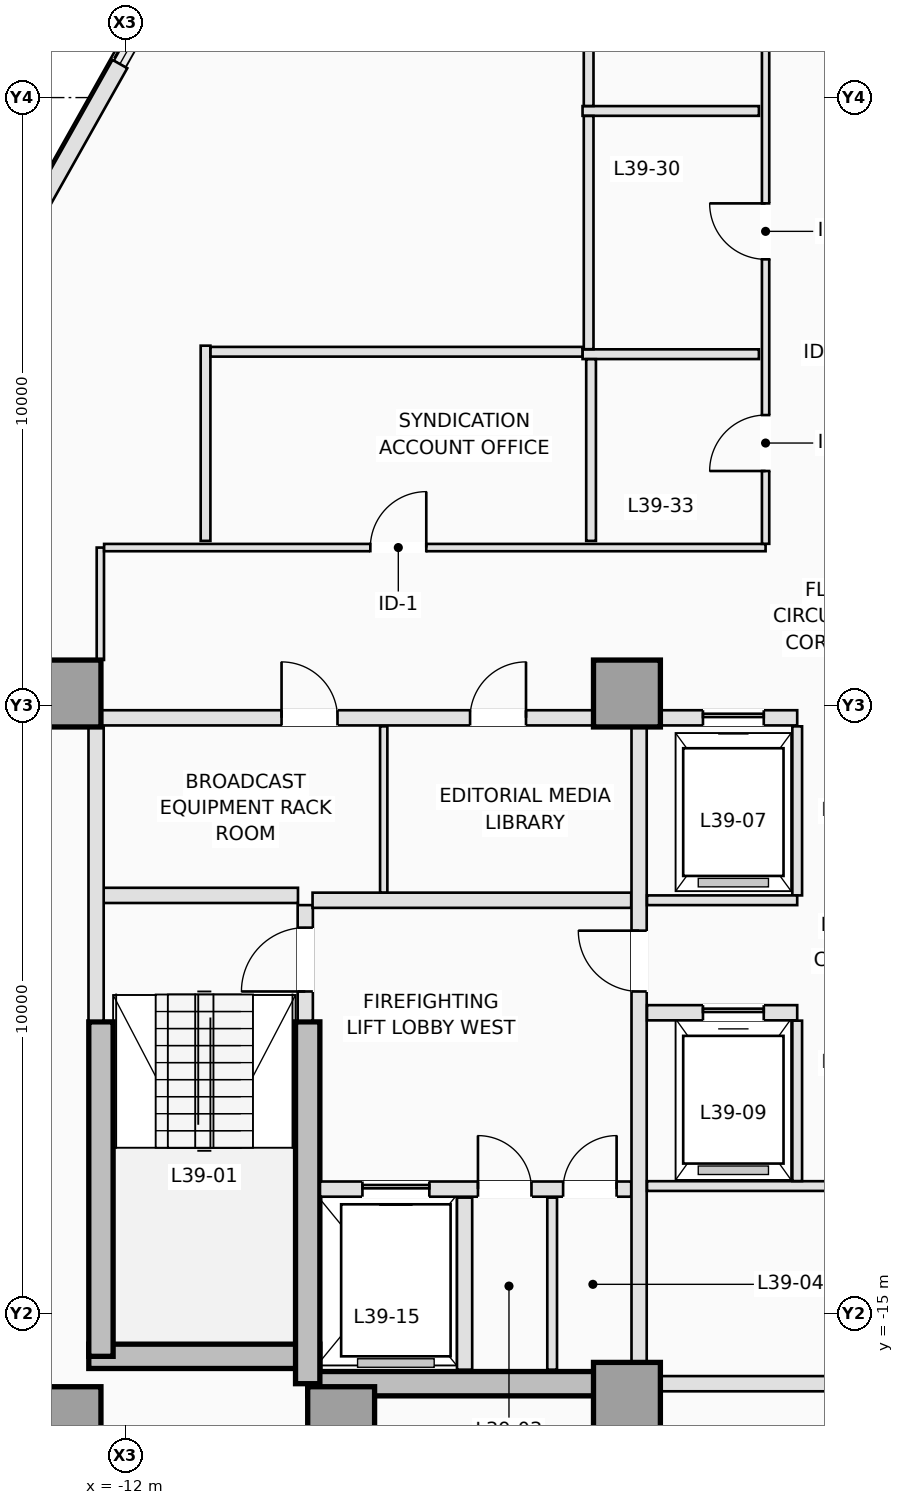
"""IFC4 building model, lengths in metres.
Left out: names, types, materials, properties, quantities, classifications, styles, units other than length and angle.
Written with IfcOpenShell. Run it as: python <this file> out.ifc"""

import sys

from ifc_helpers import new_model, si_unit, direction, frame, frame_2d, origin, origin_2d, place, context, subcontext, project, spatial, rectangle, extrude, element, fill, save


model = new_model("IFC4")
c1 = context("Model", 3, precision=1e-05, world=origin(), true_north=direction((0.0, 1.0)))
c2 = subcontext(c1, "Body", "Model", "MODEL_VIEW")
j1 = project(units=[si_unit("LENGTHUNIT", "METRE"), si_unit("PLANEANGLEUNIT", "RADIAN")], contexts=[c1])
p1 = place(None, origin())
s1 = spatial("IfcSite", under=j1, at=p1, CompositionType="ELEMENT")
p2 = place(p1, origin())
s2 = spatial("IfcBuilding", under=s1, at=p2, CompositionType="ELEMENT")
p3 = place(p2, frame((0.0, 0.0, 144.0)))
s3 = spatial("IfcBuildingStorey", under=s2, at=p3, CompositionType="ELEMENT", Elevation=144.0)
p4 = place(p3, frame((-12.6, -15.7, 0.0), z_axis=(0.0, 0.0, 1.0), x_axis=(1.0, 0.0, 0.0)))
e1 = element("IfcWall", 1, at=p4, inside=s3, PredefinedType="SHEAR", context=c2, shape_type="SweptSolid", body=[
    extrude(rectangle(XDim=3.8, YDim=0.4, at=frame_2d((1.9, 0.0))), origin(), (0.0, 0.0, 1.0), 3.5),
])
p5 = place(p3, frame((-9.0, -16.15, 0.0), z_axis=(0.0, 0.0, 1.0), x_axis=(1.0, 0.0, 0.0)))
e2 = element("IfcWall", 2, at=p5, inside=s3, PredefinedType="SHEAR", context=c2, shape_type="SweptSolid", body=[
    extrude(rectangle(XDim=5.25, YDim=0.4, at=frame_2d((2.625, 0.0))), origin(), (0.0, 0.0, 1.0), 3.5),
])
p6 = place(p3, frame((-12.4, -15.7, 0.0), z_axis=(0.0, 0.0, 1.0), x_axis=(0.0, 1.0, 0.0)))
e3 = element("IfcWall", 3, at=p6, inside=s3, PredefinedType="SHEAR", context=c2, shape_type="SweptSolid", body=[
    extrude(rectangle(XDim=5.5, YDim=0.4, at=frame_2d((2.75, 0.0))), origin(), (0.0, 0.0, 1.0), 3.5),
])
p7 = place(p3, frame((-9.0, -16.15, 0.0), z_axis=(0.0, 0.0, 1.0), x_axis=(0.0, 1.0, 0.0)))
e4 = element("IfcWall", 4, at=p7, inside=s3, PredefinedType="SHEAR", context=c2, shape_type="SweptSolid", body=[
    extrude(rectangle(XDim=5.95, YDim=0.4, at=frame_2d((2.975, 0.0))), origin(), (0.0, 0.0, 1.0), 3.5),
])
for number, where, z_axis, x_axis in (
    (5, (-12.95, -16.75, 0.0), (0.0, 0.0, 1.0), (1.0, 0.0, 0.0)),
    (6, (-8.45, -16.75, 0.0), (0.0, 0.0, 1.0), (1.0, 0.0, 0.0)),
    (7, (-3.75, -16.35, 0.0), (0.0, 0.0, 1.0), (1.0, 0.0, 0.0)),
    (8, (-12.95, -4.8, 0.0), (0.0, 0.0, 1.0), (1.0, 0.0, 0.0)),
    (9, (-3.75, -4.8, 0.0), (0.0, 0.0, 1.0), (1.0, 0.0, 0.0)),
):
    element("IfcColumn", number, at=place(p3, frame(where, z_axis=z_axis, x_axis=x_axis)), inside=s3, PredefinedType="COLUMN", context=c2, shape_type="SweptSolid", body=[
        extrude(rectangle(XDim=1.1, YDim=1.1, at=origin_2d()), origin(), (0.0, 0.0, 1.0), 3.5),
    ])
p8 = place(p3, frame((-13.706, 2.677, 0.0), z_axis=(0.0, 0.0, 1.0), x_axis=(0.490285834707, 0.871561701938, 0.0)))
e10 = element("IfcWall", 10, at=p8, inside=s3, PredefinedType="STANDARD", context=c2, shape_type="SweptSolid", body=[
    extrude(rectangle(XDim=3.299, YDim=0.28, at=frame_2d((1.649, 0.0))), origin(), (0.0, 0.0, 1.0), 3.25),
])
p9 = place(p3, frame((-9.04, -10.18, 0.0), z_axis=(0.0, 0.0, 1.0), x_axis=(0.0, 1.0, 0.0)))
e11 = element("IfcWall", 11, at=p9, inside=s3, PredefinedType="PARTITIONING", context=c2, shape_type="SweptSolid", body=[
    extrude(rectangle(XDim=1.9, YDim=0.25, at=frame_2d((0.95, 0.0))), origin(), (0.0, 0.0, 1.0), 3.25),
])
p10 = place(p9, frame((0.48, 0.0, 0.0)))
e12 = element("IfcOpeningElement", 12, at=p10, cuts=e11, PredefinedType="OPENING", context=c2, shape_type="SweptSolid", body=[
    extrude(rectangle(XDim=1.05, YDim=2.15, at=frame_2d((0.525, 1.075))), frame((0.0, 0.135, 0.0), z_axis=(0.0, -1.0, 0.0), x_axis=(1.0, 0.0, 0.0)), (0.0, 0.0, 1.0), 0.27),
])
p11 = place(p3, frame((-12.38, -8.12, 0.0), z_axis=(0.0, 0.0, 1.0), x_axis=(1.0, 0.0, 0.0)))
e13 = element("IfcWall", 13, at=p11, inside=s3, PredefinedType="PARTITIONING", context=c2, shape_type="SweptSolid", body=[
    extrude(rectangle(XDim=3.22, YDim=0.25, at=frame_2d((1.61, 0.0))), origin(), (0.0, 0.0, 1.0), 3.25),
])
p12 = place(p3, frame((-12.48, -10.18, 0.0), z_axis=(0.0, 0.0, 1.0), x_axis=(0.0, 1.0, 0.0)))
e14 = element("IfcWall", 14, at=p12, inside=s3, PredefinedType="PARTITIONING", context=c2, shape_type="SweptSolid", body=[
    extrude(rectangle(XDim=4.828, YDim=0.25, at=frame_2d((2.414, 0.0))), origin(), (0.0, 0.0, 1.0), 3.25),
])
p13 = place(p3, frame((-8.798, -12.95, 0.0), z_axis=(0.0, 0.0, 1.0), x_axis=(1.0, 0.0, 0.0)))
e15 = element("IfcWall", 15, at=p13, inside=s3, PredefinedType="PARTITIONING", context=c2, shape_type="SweptSolid", body=[
    extrude(rectangle(XDim=5.118, YDim=0.25, at=frame_2d((2.559, 0.0))), origin(), (0.0, 0.0, 1.0), 3.25),
])
p14 = place(p13, frame((0.698, 0.0, 0.0)))
e16 = element("IfcOpeningElement", 16, at=p14, cuts=e15, PredefinedType="OPENING", context=c2, shape_type="SweptSolid", body=[
    extrude(rectangle(XDim=1.1, YDim=2.15, at=frame_2d((0.55, 1.075))), frame((0.0, 0.135, 0.0), z_axis=(0.0, -1.0, 0.0), x_axis=(1.0, 0.0, 0.0)), (0.0, 0.0, 1.0), 0.27),
])
p15 = place(p13, frame((2.598, 0.0, 0.0)))
e17 = element("IfcOpeningElement", 17, at=p15, cuts=e15, PredefinedType="OPENING", context=c2, shape_type="SweptSolid", body=[
    extrude(rectangle(XDim=0.88, YDim=2.1, at=frame_2d((0.44, 1.05))), frame((0.0, 0.135, 0.0), z_axis=(0.0, -1.0, 0.0), x_axis=(1.0, 0.0, 0.0)), (0.0, 0.0, 1.0), 0.27),
])
p16 = place(p13, frame((3.998, 0.0, 0.0)))
e18 = element("IfcOpeningElement", 18, at=p16, cuts=e15, PredefinedType="OPENING", context=c2, shape_type="SweptSolid", body=[
    extrude(rectangle(XDim=0.88, YDim=2.1, at=frame_2d((0.44, 1.05))), frame((0.0, 0.135, 0.0), z_axis=(0.0, -1.0, 0.0), x_axis=(1.0, 0.0, 0.0)), (0.0, 0.0, 1.0), 0.27),
])
p17 = place(p3, frame((-6.42, -15.92, 0.0), z_axis=(0.0, 0.0, 1.0), x_axis=(0.0, 1.0, 0.0)))
e19 = element("IfcWall", 19, at=p17, inside=s3, PredefinedType="PARTITIONING", context=c2, shape_type="SweptSolid", body=[
    extrude(rectangle(XDim=2.83, YDim=0.25, at=frame_2d((1.415, 0.0))), origin(), (0.0, 0.0, 1.0), 3.25),
])
p18 = place(p3, frame((-4.98, -15.92, 0.0), z_axis=(0.0, 0.0, 1.0), x_axis=(0.0, 1.0, 0.0)))
e20 = element("IfcWall", 20, at=p18, inside=s3, PredefinedType="PARTITIONING", context=c2, shape_type="SweptSolid", body=[
    extrude(rectangle(XDim=2.83, YDim=0.16, at=frame_2d((1.415, 0.0))), origin(), (0.0, 0.0, 1.0), 3.25),
])
p19 = place(p3, frame((-8.92, -8.2, 0.0), z_axis=(0.0, 0.0, 1.0), x_axis=(1.0, 0.0, 0.0)))
e21 = element("IfcWall", 21, at=p19, inside=s3, PredefinedType="PARTITIONING", context=c2, shape_type="SweptSolid", body=[
    extrude(rectangle(XDim=5.24, YDim=0.25, at=frame_2d((2.62, 0.0))), origin(), (0.0, 0.0, 1.0), 3.25),
])
p20 = place(p3, frame((-3.55, -15.798, 0.0), z_axis=(0.0, 0.0, 1.0), x_axis=(0.0, 1.0, 0.0)))
e22 = element("IfcWall", 22, at=p20, inside=s3, PredefinedType="PARTITIONING", context=c2, shape_type="SweptSolid", body=[
    extrude(rectangle(XDim=10.446, YDim=0.25, at=frame_2d((5.223, 0.0))), origin(), (0.0, 0.0, 1.0), 3.25),
])
p21 = place(p20, frame((6.098, 0.0, 0.0)))
e23 = element("IfcOpeningElement", 23, at=p21, cuts=e22, PredefinedType="OPENING", context=c2, shape_type="SweptSolid", body=[
    extrude(rectangle(XDim=1.0, YDim=2.15, at=frame_2d((0.5, 1.075))), frame((0.0, 0.135, 0.0), z_axis=(0.0, -1.0, 0.0), x_axis=(1.0, 0.0, 0.0)), (0.0, 0.0, 1.0), 0.27),
])
p22 = place(p3, frame((-12.398, -5.2, 0.0), z_axis=(0.0, 0.0, 1.0), x_axis=(1.0, 0.0, 0.0)))
e24 = element("IfcWall", 24, at=p22, inside=s3, PredefinedType="PARTITIONING", context=c2, shape_type="SweptSolid", body=[
    extrude(rectangle(XDim=8.096, YDim=0.25, at=frame_2d((4.048, 0.0))), origin(), (0.0, 0.0, 1.0), 3.25),
])
p23 = place(p22, frame((2.968, 0.0, 0.0)))
e25 = element("IfcOpeningElement", 25, at=p23, cuts=e24, PredefinedType="OPENING", context=c2, shape_type="SweptSolid", body=[
    extrude(rectangle(XDim=0.92, YDim=2.12, at=frame_2d((0.46, 1.06))), frame((0.0, 0.135, 0.0), z_axis=(0.0, -1.0, 0.0), x_axis=(1.0, 0.0, 0.0)), (0.0, 0.0, 1.0), 0.27),
])
p24 = place(p22, frame((6.068, 0.0, 0.0)))
e26 = element("IfcOpeningElement", 26, at=p24, cuts=e24, PredefinedType="OPENING", context=c2, shape_type="SweptSolid", body=[
    extrude(rectangle(XDim=0.92, YDim=2.12, at=frame_2d((0.46, 1.06))), frame((0.0, 0.135, 0.0), z_axis=(0.0, -1.0, 0.0), x_axis=(1.0, 0.0, 0.0)), (0.0, 0.0, 1.0), 0.27),
])
p25 = place(p3, frame((-3.198, -5.2, 0.0), z_axis=(0.0, 0.0, 1.0), x_axis=(1.0, 0.0, 0.0)))
e27 = element("IfcWall", 27, at=p25, inside=s3, PredefinedType="PARTITIONING", context=c2, shape_type="SweptSolid", body=[
    extrude(rectangle(XDim=2.248, YDim=0.25, at=frame_2d((1.124, 0.0))), origin(), (0.0, 0.0, 1.0), 3.25),
])
p26 = place(p25, frame((0.698, 0.0, 0.0)))
e28 = element("IfcOpeningElement", 28, at=p26, cuts=e27, PredefinedType="OPENING", context=c2, shape_type="SweptSolid", body=[
    extrude(rectangle(XDim=1.0, YDim=2.15, at=frame_2d((0.5, 1.075))), frame((0.0, 0.135, 0.0), z_axis=(0.0, -1.0, 0.0), x_axis=(1.0, 0.0, 0.0)), (0.0, 0.0, 1.0), 0.27),
])
p27 = place(p3, frame((-7.75, -8.073, 0.0), z_axis=(0.0, 0.0, 1.0), x_axis=(0.0, 1.0, 0.0)))
e29 = element("IfcWall", 29, at=p27, inside=s3, PredefinedType="PARTITIONING", context=c2, shape_type="SweptSolid", body=[
    extrude(rectangle(XDim=2.733, YDim=0.12, at=frame_2d((1.366, 0.0))), origin(), (0.0, 0.0, 1.0), 3.25),
])
p28 = place(p3, frame((-3.198, -16.15, 0.0), z_axis=(0.0, 0.0, 1.0), x_axis=(1.0, 0.0, 0.0)))
e30 = element("IfcWall", 30, at=p28, inside=s3, PredefinedType="PARTITIONING", context=c2, shape_type="SweptSolid", body=[
    extrude(rectangle(XDim=6.396, YDim=0.25, at=frame_2d((3.198, 0.0))), origin(), (0.0, 0.0, 1.0), 2.45),
])
p29 = place(p3, frame((-0.95, -8.12, 0.0), z_axis=(0.0, 0.0, 1.0), x_axis=(0.0, 1.0, 0.0)))
e31 = element("IfcWall", 31, at=p29, inside=s3, PredefinedType="PARTITIONING", context=c2, shape_type="SweptSolid", body=[
    extrude(rectangle(XDim=2.78, YDim=0.16, at=frame_2d((1.39, 0.0))), origin(), (0.0, 0.0, 1.0), 3.25),
])
p30 = place(p3, frame((-3.42, -8.2, 0.0), z_axis=(0.0, 0.0, 1.0), x_axis=(1.0, 0.0, 0.0)))
e32 = element("IfcWall", 32, at=p30, inside=s3, PredefinedType="PARTITIONING", context=c2, shape_type="SweptSolid", body=[
    extrude(rectangle(XDim=2.47, YDim=0.16, at=frame_2d((1.235, 0.0))), origin(), (0.0, 0.0, 1.0), 3.25),
])
p31 = place(p3, frame((-3.42, -10.05, 0.0), z_axis=(0.0, 0.0, 1.0), x_axis=(1.0, 0.0, 0.0)))
e33 = element("IfcWall", 33, at=p31, inside=s3, PredefinedType="PARTITIONING", context=c2, shape_type="SweptSolid", body=[
    extrude(rectangle(XDim=2.47, YDim=0.25, at=frame_2d((1.235, 0.0))), origin(), (0.0, 0.0, 1.0), 3.25),
])
p32 = place(p31, frame((0.92, 0.0, 0.0)))
e34 = element("IfcOpeningElement", 34, at=p32, cuts=e33, PredefinedType="OPENING", context=c2, shape_type="SweptSolid", body=[
    extrude(rectangle(XDim=1.0, YDim=2.15, at=frame_2d((0.5, 1.075))), frame((0.0, 0.135, 0.0), z_axis=(0.0, -1.0, 0.0), x_axis=(1.0, 0.0, 0.0)), (0.0, 0.0, 1.0), 0.27),
])
p33 = place(p3, frame((-3.42, -12.9, 0.0), z_axis=(0.0, 0.0, 1.0), x_axis=(1.0, 0.0, 0.0)))
e35 = element("IfcWall", 35, at=p33, inside=s3, PredefinedType="PARTITIONING", context=c2, shape_type="SweptSolid", body=[
    extrude(rectangle(XDim=6.84, YDim=0.16, at=frame_2d((3.42, 0.0))), origin(), (0.0, 0.0, 1.0), 3.25),
])
p34 = place(p33, frame((2.98, 0.0, 0.0)))
e36 = element("IfcOpeningElement", 36, at=p34, cuts=e35, PredefinedType="OPENING", context=c2, shape_type="SweptSolid", body=[
    extrude(rectangle(XDim=0.88, YDim=2.12, at=frame_2d((0.44, 1.06))), frame((0.0, 0.09, 0.0), z_axis=(0.0, -1.0, 0.0), x_axis=(1.0, 0.0, 0.0)), (0.0, 0.0, 1.0), 0.18),
])
p35 = place(p3, frame((-0.95, -12.818, 0.0), z_axis=(0.0, 0.0, 1.0), x_axis=(0.0, 1.0, 0.0)))
e37 = element("IfcWall", 37, at=p35, inside=s3, PredefinedType="PARTITIONING", context=c2, shape_type="SweptSolid", body=[
    extrude(rectangle(XDim=2.638, YDim=0.16, at=frame_2d((1.319, 0.0))), origin(), (0.0, 0.0, 1.0), 3.25),
])
p36 = place(p3, frame((-12.41, -4.248, 0.0), z_axis=(0.0, 0.0, 1.0), x_axis=(0.0, 1.0, 0.0)))
e38 = element("IfcWall", 38, at=p36, inside=s3, PredefinedType="PARTITIONING", context=c2, shape_type="SweptSolid", body=[
    extrude(rectangle(XDim=1.848, YDim=0.12, at=frame_2d((0.924, 0.0))), origin(), (0.0, 0.0, 1.0), 3.25),
])
p37 = place(p3, frame((-12.348, -2.4, 0.0), z_axis=(0.0, 0.0, 1.0), x_axis=(1.0, 0.0, 0.0)))
e39 = element("IfcWall", 39, at=p37, inside=s3, PredefinedType="PARTITIONING", context=c2, shape_type="SweptSolid", body=[
    extrude(rectangle(XDim=10.878, YDim=0.12, at=frame_2d((5.439, 0.0))), origin(), (0.0, 0.0, 1.0), 2.891),
])
p38 = place(p37, frame((4.378, 0.0, 0.0)))
e40 = element("IfcOpeningElement", 40, at=p38, cuts=e39, PredefinedType="OPENING", context=c2, shape_type="SweptSolid", body=[
    extrude(rectangle(XDim=0.92, YDim=2.12, at=frame_2d((0.46, 1.06))), frame((0.0, 0.07, 0.0), z_axis=(0.0, -1.0, 0.0), x_axis=(1.0, 0.0, 0.0)), (0.0, 0.0, 1.0), 0.14),
])
p39 = place(p3, frame((-1.47, -2.338, 0.0), z_axis=(0.0, 0.0, 1.0), x_axis=(0.0, 1.0, 0.0)))
e41 = element("IfcWall", 41, at=p39, inside=s3, PredefinedType="PARTITIONING", context=c2, shape_type="SweptSolid", body=[
    extrude(rectangle(XDim=12.338, YDim=0.12, at=frame_2d((6.169, 0.0))), origin(), (0.0, 0.0, 1.0), 3.25),
])
p40 = place(p39, frame((8.678, 0.0, 0.0)))
e42 = element("IfcOpeningElement", 42, at=p40, cuts=e41, PredefinedType="OPENING", context=c2, shape_type="SweptSolid", body=[
    extrude(rectangle(XDim=0.92, YDim=2.12, at=frame_2d((0.46, 1.06))), frame((0.0, 0.07, 0.0), z_axis=(0.0, -1.0, 0.0), x_axis=(1.0, 0.0, 0.0)), (0.0, 0.0, 1.0), 0.14),
])
p41 = place(p39, frame((4.678, 0.0, 0.0)))
e43 = element("IfcOpeningElement", 43, at=p41, cuts=e41, PredefinedType="OPENING", context=c2, shape_type="SweptSolid", body=[
    extrude(rectangle(XDim=0.92, YDim=2.12, at=frame_2d((0.46, 1.06))), frame((0.0, 0.07, 0.0), z_axis=(0.0, -1.0, 0.0), x_axis=(1.0, 0.0, 0.0)), (0.0, 0.0, 1.0), 0.14),
])
p42 = place(p39, frame((1.197, 0.0, 0.0)))
e44 = element("IfcOpeningElement", 44, at=p42, cuts=e41, PredefinedType="OPENING", context=c2, shape_type="SweptSolid", body=[
    extrude(rectangle(XDim=0.92, YDim=2.12, at=frame_2d((0.46, 1.06))), frame((0.0, 0.07, 0.0), z_axis=(0.0, -1.0, 0.0), x_axis=(1.0, 0.0, 0.0)), (0.0, 0.0, 1.0), 0.14),
])
p43 = place(p3, frame((-1.58, 4.78, 0.0), z_axis=(0.0, 0.0, 1.0), x_axis=(-1.0, 0.0, 0.0)))
e45 = element("IfcWall", 45, at=p43, inside=s3, PredefinedType="PARTITIONING", context=c2, shape_type="SweptSolid", body=[
    extrude(rectangle(XDim=2.9, YDim=0.16, at=frame_2d((1.45, 0.0))), origin(), (0.0, 0.0, 1.0), 3.25),
])
p44 = place(p3, frame((-4.38, 4.862, 0.0), z_axis=(0.0, 0.0, 1.0), x_axis=(0.0, 1.0, 0.0)))
e46 = element("IfcWall", 46, at=p44, inside=s3, PredefinedType="PARTITIONING", context=c2, shape_type="SweptSolid", body=[
    extrude(rectangle(XDim=3.836, YDim=0.16, at=frame_2d((1.918, 0.0))), origin(), (0.0, 0.0, 1.0), 3.25),
])
p45 = place(p3, frame((-1.58, 0.78, 0.0), z_axis=(0.0, 0.0, 1.0), x_axis=(-1.0, 0.0, 0.0)))
e47 = element("IfcWall", 47, at=p45, inside=s3, PredefinedType="PARTITIONING", context=c2, shape_type="SweptSolid", body=[
    extrude(rectangle(XDim=2.9, YDim=0.16, at=frame_2d((1.45, 0.0))), origin(), (0.0, 0.0, 1.0), 3.25),
])
p46 = place(p3, frame((-4.38, 0.862, 0.0), z_axis=(0.0, 0.0, 1.0), x_axis=(0.0, 1.0, 0.0)))
e48 = element("IfcWall", 48, at=p46, inside=s3, PredefinedType="PARTITIONING", context=c2, shape_type="SweptSolid", body=[
    extrude(rectangle(XDim=3.836, YDim=0.16, at=frame_2d((1.918, 0.0))), origin(), (0.0, 0.0, 1.0), 3.25),
])
p47 = place(p3, frame((-4.34, 0.698, 0.0), z_axis=(0.0, 0.0, 1.0), x_axis=(0.0, -1.0, 0.0)))
e49 = element("IfcWall", 49, at=p47, inside=s3, PredefinedType="PARTITIONING", context=c2, shape_type="SweptSolid", body=[
    extrude(rectangle(XDim=2.988, YDim=0.16, at=frame_2d((1.494, 0.0))), origin(), (0.0, 0.0, 1.0), 3.25),
])
p48 = place(p3, frame((-10.68, -2.29, 0.0), z_axis=(0.0, 0.0, 1.0), x_axis=(0.0, 1.0, 0.0)))
e50 = element("IfcWall", 50, at=p48, inside=s3, PredefinedType="PARTITIONING", context=c2, shape_type="SweptSolid", body=[
    extrude(rectangle(XDim=3.21, YDim=0.16, at=frame_2d((1.605, 0.0))), origin(), (0.0, 0.0, 1.0), 3.25),
])
p49 = place(p3, frame((-10.598, 0.82, 0.0), z_axis=(0.0, 0.0, 1.0), x_axis=(1.0, 0.0, 0.0)))
e51 = element("IfcWall", 51, at=p49, inside=s3, PredefinedType="PARTITIONING", context=c2, shape_type="SweptSolid", body=[
    extrude(rectangle(XDim=6.116, YDim=0.16, at=frame_2d((3.058, 0.0))), origin(), (0.0, 0.0, 1.0), 3.25),
])
p50 = place(p26, origin())
e52 = element("IfcDoor", 52, at=p50, inside=s3, OperationType="SLIDING_TO_LEFT", PredefinedType="DOOR", context=c2, shape_type="SweptSolid", body=[
    extrude(rectangle(XDim=1.0, YDim=2.15, at=frame_2d((0.5, 1.075))), frame((0.0, 0.025, 0.0), z_axis=(0.0, -1.0, 0.0), x_axis=(1.0, 0.0, 0.0)), (0.0, 0.0, 1.0), 0.05),
])
fill(e28, e52)
p51 = place(p14, origin())
e53 = element("IfcDoor", 53, at=p51, inside=s3, OperationType="SLIDING_TO_LEFT", PredefinedType="DOOR", context=c2, shape_type="SweptSolid", body=[
    extrude(rectangle(XDim=1.1, YDim=2.15, at=frame_2d((0.55, 1.075))), frame((0.0, 0.025, 0.0), z_axis=(0.0, -1.0, 0.0), x_axis=(1.0, 0.0, 0.0)), (0.0, 0.0, 1.0), 0.05),
])
fill(e16, e53)
p52 = place(p32, origin())
e54 = element("IfcDoor", 54, at=p52, inside=s3, OperationType="SLIDING_TO_LEFT", PredefinedType="DOOR", context=c2, shape_type="SweptSolid", body=[
    extrude(rectangle(XDim=1.0, YDim=2.15, at=frame_2d((0.5, 1.075))), frame((0.0, 0.025, 0.0), z_axis=(0.0, -1.0, 0.0), x_axis=(1.0, 0.0, 0.0)), (0.0, 0.0, 1.0), 0.05),
])
fill(e34, e54)
p53 = place(p10, origin())
e55 = element("IfcDoor", 55, at=p53, inside=s3, OperationType="SINGLE_SWING_LEFT", PredefinedType="DOOR", context=c2, shape_type="SweptSolid", body=[
    extrude(rectangle(XDim=1.05, YDim=2.15, at=frame_2d((0.525, 1.075))), frame((0.0, 0.025, 0.0), z_axis=(0.0, -1.0, 0.0), x_axis=(1.0, 0.0, 0.0)), (0.0, 0.0, 1.0), 0.05),
])
fill(e12, e55)
p54 = place(p15, origin())
e56 = element("IfcDoor", 56, at=p54, inside=s3, OperationType="SINGLE_SWING_LEFT", PredefinedType="TRAPDOOR", context=c2, shape_type="SweptSolid", body=[
    extrude(rectangle(XDim=0.88, YDim=2.1, at=frame_2d((0.44, 1.05))), frame((0.0, 0.025, 0.0), z_axis=(0.0, -1.0, 0.0), x_axis=(1.0, 0.0, 0.0)), (0.0, 0.0, 1.0), 0.05),
])
fill(e17, e56)
p55 = place(p16, origin())
e57 = element("IfcDoor", 57, at=p55, inside=s3, OperationType="SINGLE_SWING_RIGHT", PredefinedType="TRAPDOOR", context=c2, shape_type="SweptSolid", body=[
    extrude(rectangle(XDim=0.88, YDim=2.1, at=frame_2d((0.44, 1.05))), frame((0.0, 0.025, 0.0), z_axis=(0.0, -1.0, 0.0), x_axis=(1.0, 0.0, 0.0)), (0.0, 0.0, 1.0), 0.05),
])
fill(e18, e57)
p56 = place(p21, origin())
e58 = element("IfcDoor", 58, at=p56, inside=s3, OperationType="SINGLE_SWING_RIGHT", PredefinedType="DOOR", context=c2, shape_type="SweptSolid", body=[
    extrude(rectangle(XDim=1.0, YDim=2.15, at=frame_2d((0.5, 1.075))), frame((0.0, 0.025, 0.0), z_axis=(0.0, -1.0, 0.0), x_axis=(1.0, 0.0, 0.0)), (0.0, 0.0, 1.0), 0.05),
])
fill(e23, e58)
p57 = place(p23, origin())
e59 = element("IfcDoor", 59, at=p57, inside=s3, OperationType="SINGLE_SWING_LEFT", PredefinedType="DOOR", context=c2, shape_type="SweptSolid", body=[
    extrude(rectangle(XDim=0.92, YDim=2.12, at=frame_2d((0.46, 1.06))), frame((0.0, 0.025, 0.0), z_axis=(0.0, -1.0, 0.0), x_axis=(1.0, 0.0, 0.0)), (0.0, 0.0, 1.0), 0.05),
])
fill(e25, e59)
p58 = place(p24, origin())
e60 = element("IfcDoor", 60, at=p58, inside=s3, OperationType="SINGLE_SWING_RIGHT", PredefinedType="DOOR", context=c2, shape_type="SweptSolid", body=[
    extrude(rectangle(XDim=0.92, YDim=2.12, at=frame_2d((0.46, 1.06))), frame((0.0, 0.025, 0.0), z_axis=(0.0, -1.0, 0.0), x_axis=(1.0, 0.0, 0.0)), (0.0, 0.0, 1.0), 0.05),
])
fill(e26, e60)
p59 = place(p41, origin())
e61 = element("IfcDoor", 61, at=p59, inside=s3, OperationType="SINGLE_SWING_RIGHT", PredefinedType="DOOR", context=c2, shape_type="SweptSolid", body=[
    extrude(rectangle(XDim=0.92, YDim=2.12, at=frame_2d((0.46, 1.06))), frame((0.0, 0.025, 0.0), z_axis=(0.0, -1.0, 0.0), x_axis=(1.0, 0.0, 0.0)), (0.0, 0.0, 1.0), 0.05),
])
fill(e43, e61)
p60 = place(p38, origin())
e62 = element("IfcDoor", 62, at=p60, inside=s3, OperationType="SINGLE_SWING_RIGHT", PredefinedType="DOOR", context=c2, shape_type="SweptSolid", body=[
    extrude(rectangle(XDim=0.92, YDim=2.12, at=frame_2d((0.46, 1.06))), frame((0.0, 0.025, 0.0), z_axis=(0.0, -1.0, 0.0), x_axis=(1.0, 0.0, 0.0)), (0.0, 0.0, 1.0), 0.05),
])
fill(e40, e62)
p61 = place(p42, origin())
e63 = element("IfcDoor", 63, at=p61, inside=s3, OperationType="SINGLE_SWING_LEFT", PredefinedType="DOOR", context=c2, shape_type="SweptSolid", body=[
    extrude(rectangle(XDim=0.92, YDim=2.12, at=frame_2d((0.46, 1.06))), frame((0.0, 0.025, 0.0), z_axis=(0.0, -1.0, 0.0), x_axis=(1.0, 0.0, 0.0)), (0.0, 0.0, 1.0), 0.05),
])
fill(e44, e63)
save(model, sys.argv[1])
